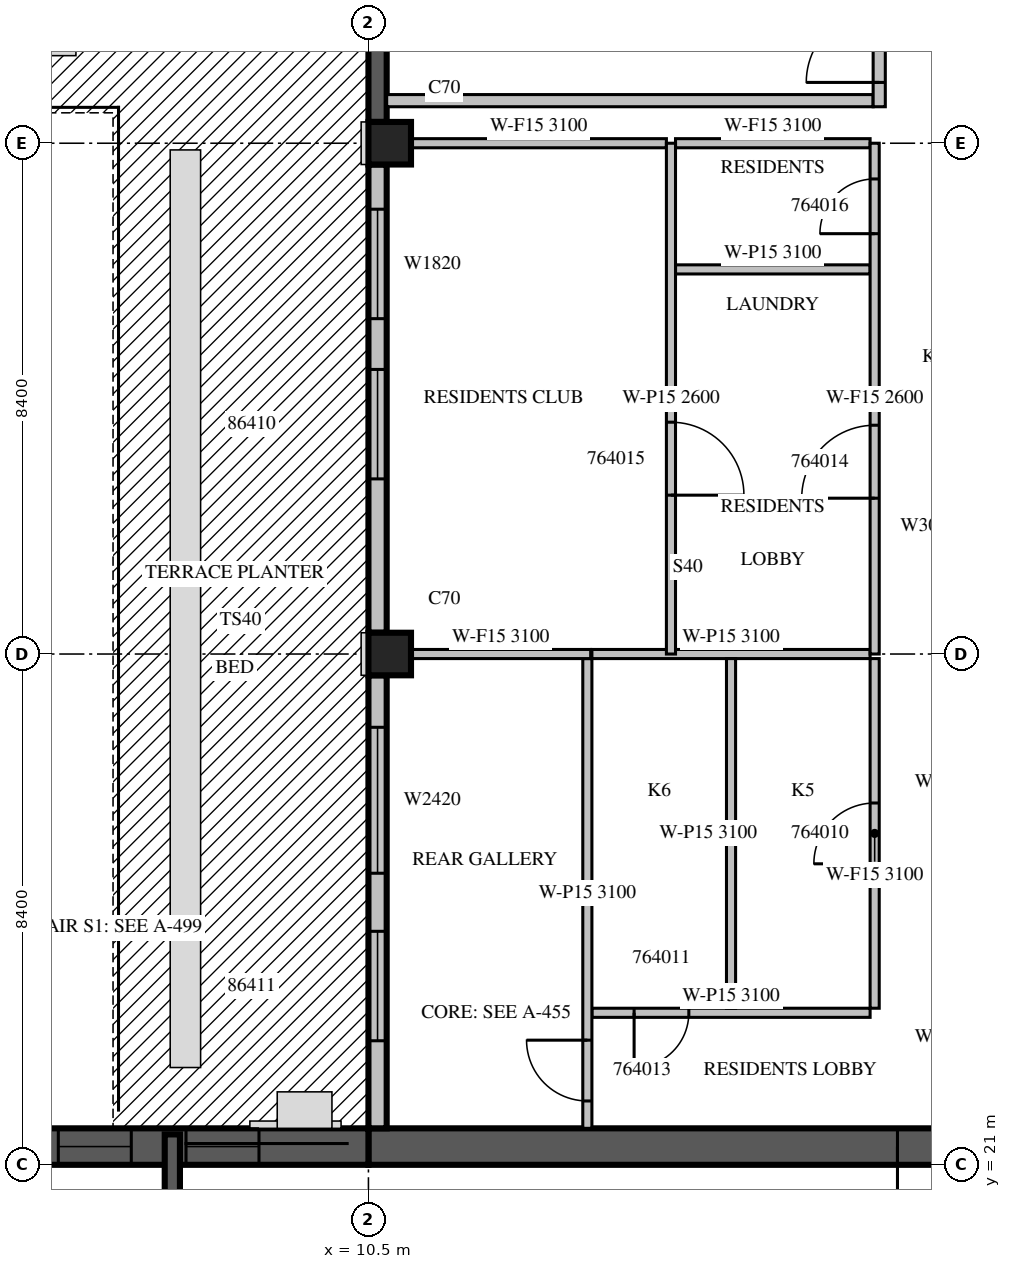
"""IFC4 building model, lengths in metres.
Left out: names, types, materials, properties, quantities, classifications, styles, units other than length and angle.
Written with IfcOpenShell. Run it as: python <this file> out.ifc"""

import sys

from ifc_helpers import new_model, si_unit, direction, frame, frame_2d, origin, origin_2d, place, context, subcontext, project, spatial, rectangle, extrude, source, transform, mapped, element, fill, save


model = new_model("IFC4")
c1 = context("Model", 3, precision=1e-05, world=origin(), true_north=direction((0.0, 1.0)))
c2 = subcontext(c1, "Body", "Model", "MODEL_VIEW")
j1 = project(units=[si_unit("LENGTHUNIT", "METRE"), si_unit("PLANEANGLEUNIT", "RADIAN")], contexts=[c1])
p1 = place(None, origin())
s1 = spatial("IfcSite", under=j1, at=p1, CompositionType="ELEMENT")
p2 = place(p1, origin())
s2 = spatial("IfcBuilding", under=s1, at=p2, CompositionType="ELEMENT")
p3 = place(p2, frame((0.0, 0.0, 284.5)))
s3 = spatial("IfcBuildingStorey", under=s2, at=p3, CompositionType="ELEMENT", Elevation=284.5)
m1 = source(origin(), c2, "Body", "SweptSolid", [
    extrude(rectangle(XDim=0.7, YDim=0.7, at=origin_2d()), origin(), (0.0, 0.0, 1.0), 3.5),
])
for number, where, z_axis, x_axis in (
    (1, (10.85, 29.4, 0.0), (0.0, 0.0, 1.0), (1.0, 0.0, 0.0)),
    (2, (10.85, 37.8, 0.0), (0.0, 0.0, 1.0), (1.0, 0.0, 0.0)),
):
    element("IfcColumn", number, at=place(p3, frame(where, z_axis=z_axis, x_axis=x_axis)), inside=s3, PredefinedType="COLUMN", context=c2, shape_type="MappedRepresentation", body=[
        mapped(m1, transform((0.0, 0.0, 0.0), scale=1.0)),
    ])
p4 = place(p3, frame((10.5, 21.3, 0.0), z_axis=(0.0, 0.0, 1.0), x_axis=(1.0, 0.0, 0.0)))
e3 = element("IfcWall", 3, at=p4, inside=s3, PredefinedType="SHEAR", context=c2, shape_type="SweptSolid", body=[
    extrude(rectangle(XDim=11.1, YDim=0.6, at=frame_2d((5.55, 0.0))), origin(), (0.0, 0.0, 1.0), 3.5),
])
p5 = place(p4, frame((8.7, 0.0, 0.0)))
e4 = element("IfcOpeningElement", 4, at=p5, cuts=e3, PredefinedType="OPENING", context=c2, shape_type="SweptSolid", body=[
    extrude(rectangle(XDim=1.2, YDim=2.1, at=frame_2d((0.6, 1.05))), frame((0.0, 0.31, 0.0), z_axis=(0.0, -1.0, 0.0), x_axis=(1.0, 0.0, 0.0)), (0.0, 0.0, 1.0), 0.62),
])
p6 = place(p3, frame((3.9, 21.3, 0.0), z_axis=(0.0, 0.0, 1.0), x_axis=(1.0, 0.0, 0.0)))
e5 = element("IfcWall", 5, at=p6, inside=s3, PredefinedType="SHEAR", context=c2, shape_type="SweptSolid", body=[
    extrude(rectangle(XDim=6.6, YDim=0.6, at=frame_2d((3.3, 0.0))), origin(), (0.0, 0.0, 1.0), 3.5),
])
m2 = source(origin(), c2, "Body", "SweptSolid", [
    extrude(rectangle(XDim=1.2, YDim=2.4, at=frame_2d((0.6, 1.2))), frame((0.0, 0.31, 0.0), z_axis=(0.0, -1.0, 0.0), x_axis=(1.0, 0.0, 0.0)), (0.0, 0.0, 1.0), 0.62),
])
p7 = place(p6, frame((1.5, 0.0, 0.6)))
e6 = element("IfcOpeningElement", 6, at=p7, cuts=e5, PredefinedType="OPENING", context=c2, shape_type="MappedRepresentation", body=[
    mapped(m2, transform((0.0, 0.0, 0.0), scale=1.0)),
])
p8 = place(p6, frame((3.6, 0.0, 0.6)))
e7 = element("IfcOpeningElement", 7, at=p8, cuts=e5, PredefinedType="OPENING", context=c2, shape_type="MappedRepresentation", body=[
    mapped(m2, transform((0.0, 0.0, 0.0), scale=1.0)),
])
p9 = place(p3, frame((10.65, 43.68, 0.0), z_axis=(0.0, 0.0, 1.0), x_axis=(0.0, -1.0, 0.0)))
e8 = element("IfcWall", 8, at=p9, inside=s3, PredefinedType="SOLIDWALL", context=c2, shape_type="SweptSolid", body=[
    extrude(rectangle(XDim=5.53, YDim=0.3, at=frame_2d((2.765, 0.0))), origin(), (0.0, 0.0, 1.0), 3.1),
])
m3 = source(origin(), c2, "Body", "SweptSolid", [
    extrude(rectangle(XDim=7.7, YDim=0.3, at=frame_2d((3.85, 0.0))), origin(), (0.0, 0.0, 1.0), 3.1),
])
p10 = place(p3, frame((10.65, 37.45, 0.0), z_axis=(0.0, 0.0, 1.0), x_axis=(0.0, -1.0, 0.0)))
e9 = element("IfcWall", 9, at=p10, inside=s3, PredefinedType="STANDARD", context=c2, shape_type="MappedRepresentation", body=[
    mapped(m3, transform((0.0, 0.0, 0.0), scale=1.0)),
])
m4 = source(origin(), c2, "Body", "SweptSolid", [
    extrude(rectangle(XDim=1.8, YDim=2.4, at=frame_2d((0.9, 1.2))), frame((0.0, 0.16, 0.0), z_axis=(0.0, -1.0, 0.0), x_axis=(1.0, 0.0, 0.0)), (0.0, 0.0, 1.0), 0.32),
])
p11 = place(p10, frame((3.37, 0.0, 0.0)))
e10 = element("IfcOpeningElement", 10, at=p11, cuts=e9, PredefinedType="OPENING", context=c2, shape_type="MappedRepresentation", body=[
    mapped(m4, transform((0.0, 0.0, 0.0), scale=1.0)),
])
m5 = source(origin(), c2, "Body", "SweptSolid", [
    extrude(rectangle(XDim=1.8, YDim=2.0, at=frame_2d((0.9, 1.0))), frame((0.0, 0.16, 0.0), z_axis=(0.0, -1.0, 0.0), x_axis=(1.0, 0.0, 0.0)), (0.0, 0.0, 1.0), 0.32),
])
p12 = place(p10, frame((0.735, 0.0, 0.6)))
e11 = element("IfcOpeningElement", 11, at=p12, cuts=e9, PredefinedType="OPENING", context=c2, shape_type="MappedRepresentation", body=[
    mapped(m5, transform((0.0, 0.0, 0.0), scale=1.0)),
])
m6 = source(origin(), c2, "Body", "SweptSolid", [
    extrude(rectangle(XDim=7.45, YDim=0.3, at=frame_2d((3.725, 0.0))), origin(), (0.0, 0.0, 1.0), 3.1),
])
p13 = place(p3, frame((10.65, 29.05, 0.0), z_axis=(0.0, 0.0, 1.0), x_axis=(0.0, -1.0, 0.0)))
e12 = element("IfcWall", 12, at=p13, inside=s3, PredefinedType="STANDARD", context=c2, shape_type="MappedRepresentation", body=[
    mapped(m6, transform((0.0, 0.0, 0.0), scale=1.0)),
])
p14 = place(p13, frame((4.21, 0.0, 0.0)))
e13 = element("IfcOpeningElement", 13, at=p14, cuts=e12, PredefinedType="OPENING", context=c2, shape_type="MappedRepresentation", body=[
    mapped(m4, transform((0.0, 0.0, 0.0), scale=1.0)),
])
m7 = source(origin(), c2, "Body", "SweptSolid", [
    extrude(rectangle(XDim=2.4, YDim=2.0, at=frame_2d((1.2, 1.0))), frame((0.0, 0.16, 0.0), z_axis=(0.0, -1.0, 0.0), x_axis=(1.0, 0.0, 0.0)), (0.0, 0.0, 1.0), 0.32),
])
p15 = place(p13, frame((0.855, 0.0, 0.6)))
e14 = element("IfcOpeningElement", 14, at=p15, cuts=e12, PredefinedType="OPENING", context=c2, shape_type="MappedRepresentation", body=[
    mapped(m7, transform((0.0, 0.0, 0.0), scale=1.0)),
])
p16 = place(p3, frame((7.275, 14.9, 0.0), z_axis=(0.0, 0.0, 1.0), x_axis=(0.0, 1.0, 0.0)))
e15 = element("IfcWall", 15, at=p16, inside=s3, PredefinedType="SOLIDWALL", context=c2, shape_type="SweptSolid", body=[
    extrude(rectangle(XDim=6.6, YDim=0.25, at=frame_2d((3.3, 0.0))), origin(), (0.0, 0.0, 1.0), 3.1),
])
m8 = source(origin(), c2, "Body", "SweptSolid", [
    extrude(rectangle(XDim=1.1, YDim=2.1, at=frame_2d((0.55, 1.05))), frame((0.0, 0.135, 0.0), z_axis=(0.0, -1.0, 0.0), x_axis=(1.0, 0.0, 0.0)), (0.0, 0.0, 1.0), 0.27),
])
p17 = place(p16, frame((0.15, 0.0, 0.0)))
e16 = element("IfcOpeningElement", 16, at=p17, cuts=e15, PredefinedType="OPENING", context=c2, shape_type="MappedRepresentation", body=[
    mapped(m8, transform((0.0, 0.0, 0.0), scale=1.0)),
])
m9 = source(origin(), c2, "Body", "SweptSolid", [
    extrude(rectangle(XDim=8.0, YDim=0.2, at=frame_2d((4.0, 0.0))), origin(), (0.0, 0.0, 1.0), 3.1),
])
p18 = place(p3, frame((10.8, 38.5, 0.0), z_axis=(0.0, 0.0, 1.0), x_axis=(1.0, 0.0, 0.0)))
e17 = element("IfcWall", 17, at=p18, inside=s3, PredefinedType="PARTITIONING", context=c2, shape_type="MappedRepresentation", body=[
    mapped(m9, transform((0.0, 0.0, 0.0), scale=1.0)),
])
m10 = source(origin(), c2, "Body", "SweptSolid", [
    extrude(rectangle(XDim=5.45, YDim=0.2, at=frame_2d((2.725, 0.0))), origin(), (0.0, 0.0, 1.0), 3.1),
])
p19 = place(p3, frame((18.9, 38.4, 0.0), z_axis=(0.0, 0.0, 1.0), x_axis=(0.0, 1.0, 0.0)))
e18 = element("IfcWall", 18, at=p19, inside=s3, PredefinedType="PARTITIONING", context=c2, shape_type="MappedRepresentation", body=[
    mapped(m10, transform((0.0, 0.0, 0.0), scale=1.0)),
])
m11 = source(origin(), c2, "Body", "SweptSolid", [
    extrude(rectangle(XDim=1.2, YDim=2.1, at=frame_2d((0.6, 1.05))), frame((0.0, 0.11, 0.0), z_axis=(0.0, -1.0, 0.0), x_axis=(1.0, 0.0, 0.0)), (0.0, 0.0, 1.0), 0.22),
])
p20 = place(p19, frame((0.4, 0.0, 0.0)))
e19 = element("IfcOpeningElement", 19, at=p20, cuts=e18, PredefinedType="OPENING", context=c2, shape_type="MappedRepresentation", body=[
    mapped(m11, transform((0.0, 0.0, 0.0), scale=1.0)),
])
m12 = source(origin(), c2, "Body", "SweptSolid", [
    extrude(rectangle(XDim=0.9, YDim=2.1, at=frame_2d((0.45, 1.05))), frame((0.0, 0.11, 0.0), z_axis=(0.0, -1.0, 0.0), x_axis=(1.0, 0.0, 0.0)), (0.0, 0.0, 1.0), 0.22),
])
p21 = place(p19, frame((3.25, 0.0, 0.0)))
e20 = element("IfcOpeningElement", 20, at=p21, cuts=e18, PredefinedType="OPENING", context=c2, shape_type="MappedRepresentation", body=[
    mapped(m12, transform((0.0, 0.0, 0.0), scale=1.0)),
])
m13 = source(origin(), c2, "Body", "SweptSolid", [
    extrude(rectangle(XDim=4.575, YDim=0.15, at=frame_2d((2.288, 0.0))), origin(), (0.0, 0.0, 1.0), 3.1),
])
p22 = place(p3, frame((14.175, 23.5, 0.0), z_axis=(0.0, 0.0, 1.0), x_axis=(1.0, 0.0, 0.0)))
e21 = element("IfcWall", 21, at=p22, inside=s3, PredefinedType="PARTITIONING", context=c2, shape_type="MappedRepresentation", body=[
    mapped(m13, transform((0.0, 0.0, 0.0), scale=1.0)),
])
m14 = source(origin(), c2, "Body", "SweptSolid", [
    extrude(rectangle(XDim=0.9, YDim=2.1, at=frame_2d((0.45, 1.05))), frame((0.0, 0.085, 0.0), z_axis=(0.0, -1.0, 0.0), x_axis=(1.0, 0.0, 0.0)), (0.0, 0.0, 1.0), 0.17),
])
p23 = place(p22, frame((0.694, 0.0, 0.0)))
e22 = element("IfcOpeningElement", 22, at=p23, cuts=e21, PredefinedType="OPENING", context=c2, shape_type="MappedRepresentation", body=[
    mapped(m14, transform((0.0, 0.0, 0.0), scale=1.0)),
])
p24 = place(p3, frame((18.75, 29.4, 0.0), z_axis=(0.0, 0.0, 1.0), x_axis=(-1.0, 0.0, 0.0)))
e23 = element("IfcWall", 23, at=p24, inside=s3, PredefinedType="PARTITIONING", context=c2, shape_type="MappedRepresentation", body=[
    mapped(m13, transform((0.0, 0.0, 0.0), scale=1.0)),
])
m15 = source(origin(), c2, "Body", "SweptSolid", [
    extrude(rectangle(XDim=5.75, YDim=0.15, at=frame_2d((2.875, 0.0))), origin(), (0.0, 0.0, 1.0), 3.1),
])
p25 = place(p3, frame((18.825, 23.575, 0.0), z_axis=(0.0, 0.0, 1.0), x_axis=(0.0, 1.0, 0.0)))
e24 = element("IfcWall", 24, at=p25, inside=s3, PredefinedType="PARTITIONING", context=c2, shape_type="MappedRepresentation", body=[
    mapped(m15, transform((0.0, 0.0, 0.0), scale=1.0)),
])
m16 = source(origin(), c2, "Body", "SweptSolid", [
    extrude(rectangle(XDim=1.0, YDim=2.1, at=frame_2d((0.5, 1.05))), frame((0.0, 0.085, 0.0), z_axis=(0.0, -1.0, 0.0), x_axis=(1.0, 0.0, 0.0)), (0.0, 0.0, 1.0), 0.17),
])
p26 = place(p25, frame((2.375, 0.0, 0.0)))
e25 = element("IfcOpeningElement", 25, at=p26, cuts=e24, PredefinedType="OPENING", context=c2, shape_type="MappedRepresentation", body=[
    mapped(m16, transform((0.0, 0.0, 0.0), scale=1.0)),
])
p27 = place(p3, frame((16.463, 23.575, 0.0), z_axis=(0.0, 0.0, 1.0), x_axis=(0.0, 1.0, 0.0)))
e26 = element("IfcWall", 26, at=p27, inside=s3, PredefinedType="PARTITIONING", context=c2, shape_type="MappedRepresentation", body=[
    mapped(m15, transform((0.0, 0.0, 0.0), scale=1.0)),
])
m17 = source(origin(), c2, "Body", "SweptSolid", [
    extrude(rectangle(XDim=7.725, YDim=0.15, at=frame_2d((3.862, 0.0))), origin(), (0.0, 0.0, 1.0), 3.1),
])
p28 = place(p3, frame((14.1, 29.325, 0.0), z_axis=(0.0, 0.0, 1.0), x_axis=(0.0, -1.0, 0.0)))
e27 = element("IfcWall", 27, at=p28, inside=s3, PredefinedType="PARTITIONING", context=c2, shape_type="MappedRepresentation", body=[
    mapped(m17, transform((0.0, 0.0, 0.0), scale=1.0)),
])
p29 = place(p28, frame((6.275, 0.0, 0.0)))
e28 = element("IfcOpeningElement", 28, at=p29, cuts=e27, PredefinedType="OPENING", context=c2, shape_type="MappedRepresentation", body=[
    mapped(m16, transform((0.0, 0.0, 0.0), scale=1.0)),
])
m18 = source(origin(), c2, "Body", "SweptSolid", [
    extrude(rectangle(XDim=3.2, YDim=0.15, at=frame_2d((1.6, 0.0))), origin(), (0.0, 0.0, 1.0), 3.1),
])
p30 = place(p3, frame((18.75, 35.725, 0.0), z_axis=(0.0, 0.0, 1.0), x_axis=(-1.0, 0.0, 0.0)))
e29 = element("IfcWall", 29, at=p30, inside=s3, PredefinedType="PARTITIONING", context=c2, shape_type="MappedRepresentation", body=[
    mapped(m18, transform((0.0, 0.0, 0.0), scale=1.0)),
])
m19 = source(origin(), c2, "Body", "SweptSolid", [
    extrude(rectangle(XDim=2.956, YDim=0.15, at=frame_2d((1.478, 0.0))), origin(), (0.0, 0.0, 1.0), 3.1),
])
p31 = place(p3, frame((14.155, 29.4, 0.0), z_axis=(0.0, 0.0, 1.0), x_axis=(-1.0, 0.0, 0.0)))
e30 = element("IfcWall", 30, at=p31, inside=s3, PredefinedType="PARTITIONING", context=c2, shape_type="MappedRepresentation", body=[
    mapped(m19, transform((0.0, 0.0, 0.0), scale=1.0)),
])
m20 = source(origin(), c2, "Body", "SweptSolid", [
    extrude(rectangle(XDim=4.201, YDim=0.15, at=frame_2d((2.1, 0.0))), origin(), (0.0, 0.0, 1.0), 3.1),
])
p32 = place(p3, frame((15.4, 37.8, 0.0), z_axis=(0.0, 0.0, 1.0), x_axis=(-1.0, 0.0, 0.0)))
e31 = element("IfcWall", 31, at=p32, inside=s3, PredefinedType="PARTITIONING", context=c2, shape_type="MappedRepresentation", body=[
    mapped(m20, transform((0.0, 0.0, 0.0), scale=1.0)),
])
p33 = place(p3, frame((18.75, 37.8, 0.0), z_axis=(0.0, 0.0, 1.0), x_axis=(-1.0, 0.0, 0.0)))
e32 = element("IfcWall", 32, at=p33, inside=s3, PredefinedType="PARTITIONING", context=c2, shape_type="MappedRepresentation", body=[
    mapped(m18, transform((0.0, 0.0, 0.0), scale=1.0)),
])
p34 = place(p3, frame((15.475, 29.4, 0.0), z_axis=(0.0, 0.0, 1.0), x_axis=(0.0, 1.0, 0.0)))
e33 = element("IfcWall", 33, at=p34, inside=s3, PredefinedType="PARTITIONING", context=c2, shape_type="SweptSolid", body=[
    extrude(rectangle(XDim=8.4, YDim=0.15, at=frame_2d((4.2, 0.0))), origin(), (0.0, 0.0, 1.0), 2.6),
])
m21 = source(origin(), c2, "Body", "SweptSolid", [
    extrude(rectangle(XDim=1.2, YDim=2.1, at=frame_2d((0.6, 1.05))), frame((0.0, 0.085, 0.0), z_axis=(0.0, -1.0, 0.0), x_axis=(1.0, 0.0, 0.0)), (0.0, 0.0, 1.0), 0.17),
])
p35 = place(p34, frame((2.612, 0.0, 0.0)))
e34 = element("IfcOpeningElement", 34, at=p35, cuts=e33, PredefinedType="OPENING", context=c2, shape_type="MappedRepresentation", body=[
    mapped(m21, transform((0.0, 0.0, 0.0), scale=1.0)),
])
m22 = source(origin(), c2, "Body", "SweptSolid", [
    extrude(rectangle(XDim=8.4, YDim=0.15, at=frame_2d((4.2, 0.0))), origin(), (0.0, 0.0, 1.0), 2.6),
])
p36 = place(p3, frame((18.825, 29.4, 0.0), z_axis=(0.0, 0.0, 1.0), x_axis=(0.0, 1.0, 0.0)))
e35 = element("IfcWall", 35, at=p36, inside=s3, PredefinedType="PARTITIONING", context=c2, shape_type="MappedRepresentation", body=[
    mapped(m22, transform((0.0, 0.0, 0.0), scale=1.0)),
])
p37 = place(p36, frame((2.562, 0.0, 0.0)))
e36 = element("IfcOpeningElement", 36, at=p37, cuts=e35, PredefinedType="OPENING", context=c2, shape_type="MappedRepresentation", body=[
    mapped(m21, transform((0.0, 0.0, 0.0), scale=1.0)),
])
p38 = place(p36, frame((6.912, 0.0, 0.0)))
e37 = element("IfcOpeningElement", 37, at=p38, cuts=e35, PredefinedType="OPENING", context=c2, shape_type="MappedRepresentation", body=[
    mapped(m14, transform((0.0, 0.0, 0.0), scale=1.0)),
])
m23 = source(origin(), c2, "Body", "SweptSolid", [
    extrude(rectangle(XDim=1.8, YDim=2.4, at=frame_2d((0.9, 1.2))), frame((0.0, 0.025, 0.0), z_axis=(0.0, -1.0, 0.0), x_axis=(1.0, 0.0, 0.0)), (0.0, 0.0, 1.0), 0.05),
])
p39 = place(p11, origin())
e38 = element("IfcDoor", 38, at=p39, inside=s3, OperationType="SLIDING_TO_LEFT", PredefinedType="DOOR", context=c2, shape_type="MappedRepresentation", body=[
    mapped(m23, transform((0.0, 0.0, 0.0), scale=1.0)),
])
fill(e10, e38)
p40 = place(p14, origin())
e39 = element("IfcDoor", 39, at=p40, inside=s3, OperationType="SLIDING_TO_LEFT", PredefinedType="DOOR", context=c2, shape_type="MappedRepresentation", body=[
    mapped(m23, transform((0.0, 0.0, 0.0), scale=1.0)),
])
fill(e13, e39)
m24 = source(origin(), c2, "Body", "SweptSolid", [
    extrude(rectangle(XDim=1.8, YDim=2.0, at=frame_2d((0.9, 1.0))), frame((0.0, 0.03, 0.0), z_axis=(0.0, -1.0, 0.0), x_axis=(1.0, 0.0, 0.0)), (0.0, 0.0, 1.0), 0.06),
])
p41 = place(p12, origin())
e40 = element("IfcWindow", 40, at=p41, inside=s3, PartitioningType="SINGLE_PANEL", PredefinedType="WINDOW", context=c2, shape_type="MappedRepresentation", body=[
    mapped(m24, transform((0.0, 0.0, 0.0), scale=1.0)),
])
fill(e11, e40)
m25 = source(origin(), c2, "Body", "SweptSolid", [
    extrude(rectangle(XDim=2.4, YDim=2.0, at=frame_2d((1.2, 1.0))), frame((0.0, 0.03, 0.0), z_axis=(0.0, -1.0, 0.0), x_axis=(1.0, 0.0, 0.0)), (0.0, 0.0, 1.0), 0.06),
])
p42 = place(p15, origin())
e41 = element("IfcWindow", 41, at=p42, inside=s3, PartitioningType="SINGLE_PANEL", PredefinedType="WINDOW", context=c2, shape_type="MappedRepresentation", body=[
    mapped(m25, transform((0.0, 0.0, 0.0), scale=1.0)),
])
fill(e14, e41)
m26 = source(origin(), c2, "Body", "SweptSolid", [
    extrude(rectangle(XDim=1.2, YDim=2.1, at=frame_2d((0.6, 1.05))), frame((0.0, 0.025, 0.0), z_axis=(0.0, -1.0, 0.0), x_axis=(1.0, 0.0, 0.0)), (0.0, 0.0, 1.0), 0.05),
])
p43 = place(p20, origin())
e42 = element("IfcDoor", 42, at=p43, inside=s3, OperationType="SINGLE_SWING_LEFT", PredefinedType="DOOR", context=c2, shape_type="MappedRepresentation", body=[
    mapped(m26, transform((0.0, 0.0, 0.0), scale=1.0)),
])
fill(e19, e42)
p44 = place(p5, origin())
e43 = element("IfcDoor", 43, at=p44, inside=s3, OperationType="SINGLE_SWING_RIGHT", PredefinedType="DOOR", context=c2, shape_type="MappedRepresentation", body=[
    mapped(m26, transform((0.0, 0.0, 0.0), scale=1.0)),
])
fill(e4, e43)
m27 = source(origin(), c2, "Body", "SweptSolid", [
    extrude(rectangle(XDim=1.2, YDim=2.4, at=frame_2d((0.6, 1.2))), frame((0.0, 0.03, 0.0), z_axis=(0.0, -1.0, 0.0), x_axis=(1.0, 0.0, 0.0)), (0.0, 0.0, 1.0), 0.06),
])
p45 = place(p7, origin())
e44 = element("IfcWindow", 44, at=p45, inside=s3, PartitioningType="SINGLE_PANEL", PredefinedType="WINDOW", context=c2, shape_type="MappedRepresentation", body=[
    mapped(m27, transform((0.0, 0.0, 0.0), scale=1.0)),
])
fill(e6, e44)
p46 = place(p8, origin())
e45 = element("IfcWindow", 45, at=p46, inside=s3, PartitioningType="SINGLE_PANEL", PredefinedType="WINDOW", context=c2, shape_type="MappedRepresentation", body=[
    mapped(m27, transform((0.0, 0.0, 0.0), scale=1.0)),
])
fill(e7, e45)
m28 = source(origin(), c2, "Body", "SweptSolid", [
    extrude(rectangle(XDim=1.0, YDim=2.1, at=frame_2d((0.5, 1.05))), frame((0.0, 0.025, 0.0), z_axis=(0.0, -1.0, 0.0), x_axis=(1.0, 0.0, 0.0)), (0.0, 0.0, 1.0), 0.05),
])
p47 = place(p26, origin())
e46 = element("IfcDoor", 46, at=p47, inside=s3, OperationType="SINGLE_SWING_LEFT", PredefinedType="DOOR", context=c2, shape_type="MappedRepresentation", body=[
    mapped(m28, transform((0.0, 0.0, 0.0), scale=1.0)),
])
fill(e25, e46)
m29 = source(origin(), c2, "Body", "SweptSolid", [
    extrude(rectangle(XDim=0.9, YDim=2.1, at=frame_2d((0.45, 1.05))), frame((0.0, 0.025, 0.0), z_axis=(0.0, -1.0, 0.0), x_axis=(1.0, 0.0, 0.0)), (0.0, 0.0, 1.0), 0.05),
])
p48 = place(p23, origin())
e47 = element("IfcDoor", 47, at=p48, inside=s3, OperationType="SINGLE_SWING_RIGHT", PredefinedType="DOOR", context=c2, shape_type="MappedRepresentation", body=[
    mapped(m29, transform((0.0, 0.0, 0.0), scale=1.0)),
])
fill(e22, e47)
p49 = place(p29, origin())
e48 = element("IfcDoor", 48, at=p49, inside=s3, OperationType="SINGLE_SWING_RIGHT", PredefinedType="DOOR", context=c2, shape_type="MappedRepresentation", body=[
    mapped(m28, transform((0.0, 0.0, 0.0), scale=1.0)),
])
fill(e28, e48)
p50 = place(p37, origin())
e49 = element("IfcDoor", 49, at=p50, inside=s3, OperationType="SINGLE_SWING_LEFT", PredefinedType="DOOR", context=c2, shape_type="MappedRepresentation", body=[
    mapped(m26, transform((0.0, 0.0, 0.0), scale=1.0)),
])
fill(e36, e49)
p51 = place(p35, origin())
e50 = element("IfcDoor", 50, at=p51, inside=s3, OperationType="SINGLE_SWING_RIGHT", PredefinedType="DOOR", context=c2, shape_type="MappedRepresentation", body=[
    mapped(m26, transform((0.0, 0.0, 0.0), scale=1.0)),
])
fill(e34, e50)
p52 = place(p38, origin())
e51 = element("IfcDoor", 51, at=p52, inside=s3, OperationType="SINGLE_SWING_LEFT", PredefinedType="DOOR", context=c2, shape_type="MappedRepresentation", body=[
    mapped(m29, transform((0.0, 0.0, 0.0), scale=1.0)),
])
fill(e37, e51)
save(model, sys.argv[1])
